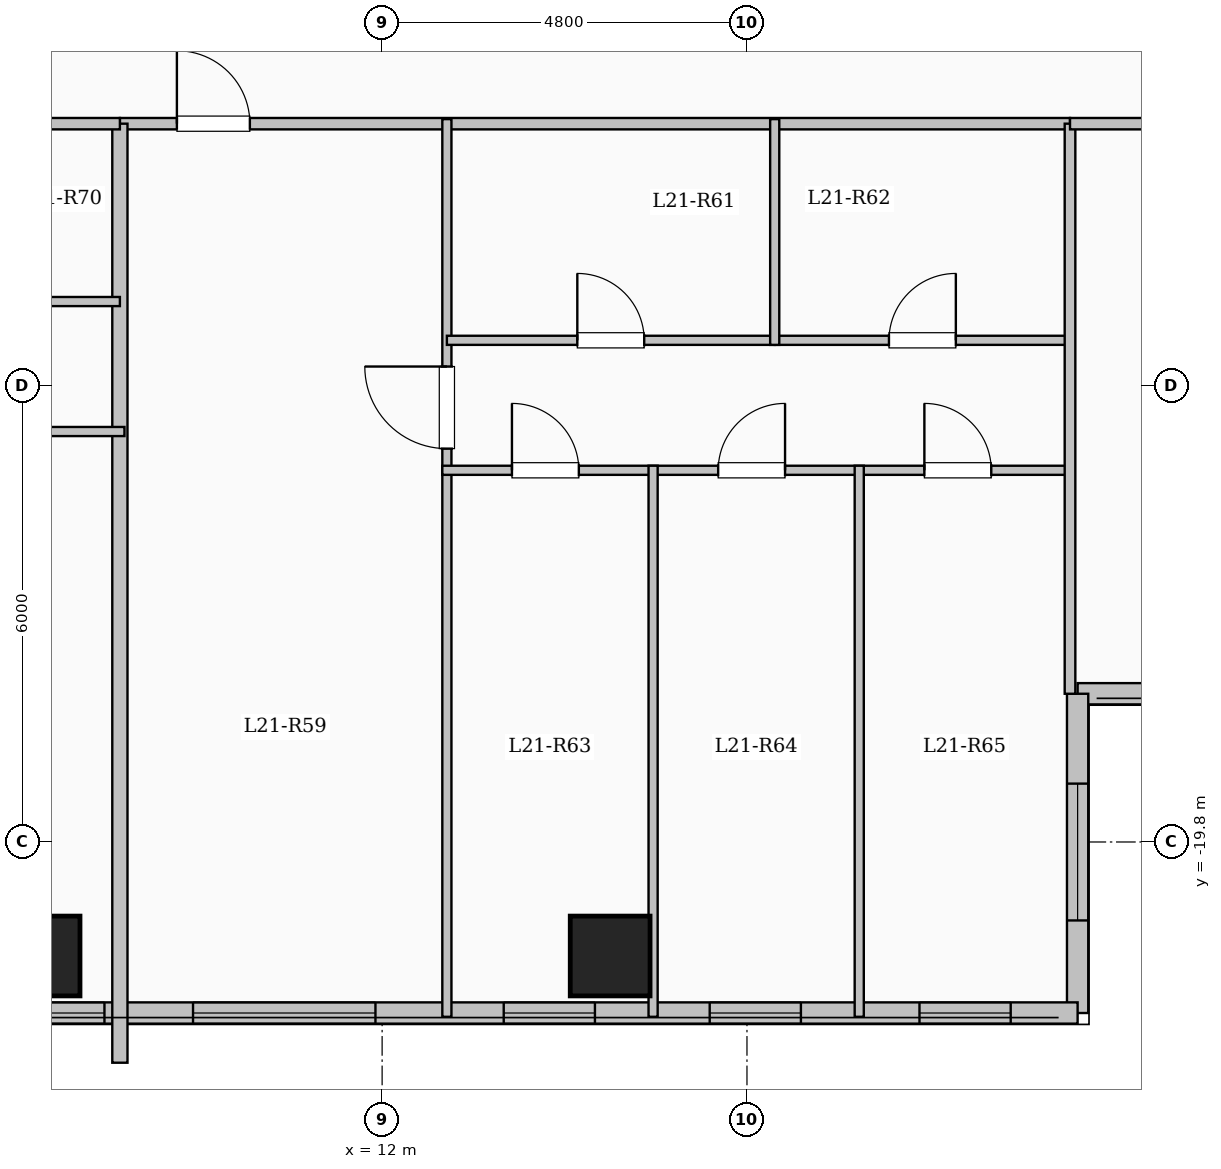
"""IFC4 building model, lengths in metres.
Left out: names, types, materials, properties, quantities, classifications, styles, units other than length and angle.
Written with IfcOpenShell. Run it as: python <this file> out.ifc"""

import sys

from ifc_helpers import new_model, si_unit, direction, frame, frame_2d, origin, origin_2d, place, context, subcontext, project, spatial, rectangle, extrude, element, fill, save


model = new_model("IFC4")
c1 = context("Model", 3, precision=1e-05, world=origin(), true_north=direction((0.0, 1.0)))
c2 = subcontext(c1, "Body", "Model", "MODEL_VIEW")
j1 = project(units=[si_unit("LENGTHUNIT", "METRE"), si_unit("PLANEANGLEUNIT", "RADIAN")], contexts=[c1])
p1 = place(None, origin())
s1 = spatial("IfcSite", under=j1, at=p1, CompositionType="ELEMENT")
p2 = place(p1, origin())
s2 = spatial("IfcBuilding", under=s1, at=p2, CompositionType="ELEMENT")
p3 = place(p2, frame((0.0, 0.0, 81.65)))
s3 = spatial("IfcBuildingStorey", under=s2, at=p3, CompositionType="ELEMENT", Elevation=81.65)
for number, where, z_axis, x_axis in (
    (1, (7.5, -21.3, 0.0), (0.0, 0.0, 1.0), (1.0, 0.0, 0.0)),
    (2, (15.0, -21.3, 0.0), (0.0, 0.0, 1.0), (1.0, 0.0, 0.0)),
):
    element("IfcColumn", number, at=place(p3, frame(where, z_axis=z_axis, x_axis=x_axis)), inside=s3, PredefinedType="COLUMN", context=c2, shape_type="SweptSolid", body=[
        extrude(rectangle(XDim=1.05, YDim=1.05, at=origin_2d()), origin(), (0.0, 0.0, 1.0), 3.35),
    ])
p4 = place(p3, frame((26.85, -17.85, 0.0), z_axis=(0.0, 0.0, 1.0), x_axis=(-1.0, 0.0, 0.0)))
e3 = element("IfcWall", 3, at=p4, inside=s3, PredefinedType="SOLIDWALL", context=c2, shape_type="SweptSolid", body=[
    extrude(rectangle(XDim=5.7, YDim=0.28, at=frame_2d((2.85, 0.0))), origin(), (0.0, 0.0, 1.0), 3.1),
])
p5 = place(p4, frame((1.675, 0.0, 0.9)))
e4 = element("IfcOpeningElement", 4, at=p5, cuts=e3, PredefinedType="OPENING", context=c2, shape_type="SweptSolid", body=[
    extrude(rectangle(XDim=2.4, YDim=1.8, at=frame_2d((1.2, 0.9))), frame((0.0, 0.15, 0.0), z_axis=(0.0, -1.0, 0.0), x_axis=(1.0, 0.0, 0.0)), (0.0, 0.0, 1.0), 0.3),
])
p6 = place(p3, frame((21.15, -17.85, 0.0), z_axis=(0.0, 0.0, 1.0), x_axis=(0.0, -1.0, 0.0)))
e5 = element("IfcWall", 5, at=p6, inside=s3, PredefinedType="SOLIDWALL", context=c2, shape_type="SweptSolid", body=[
    extrude(rectangle(XDim=4.2, YDim=0.28, at=frame_2d((2.1, 0.0))), origin(), (0.0, 0.0, 1.0), 3.1),
])
p7 = place(p6, frame((1.182, 0.0, 0.9)))
e6 = element("IfcOpeningElement", 6, at=p7, cuts=e5, PredefinedType="OPENING", context=c2, shape_type="SweptSolid", body=[
    extrude(rectangle(XDim=1.8, YDim=1.65, at=frame_2d((0.9, 0.825))), frame((0.0, 0.15, 0.0), z_axis=(0.0, -1.0, 0.0), x_axis=(1.0, 0.0, 0.0)), (0.0, 0.0, 1.0), 0.3),
])
p8 = place(p3, frame((21.15, -22.05, 0.0), z_axis=(0.0, 0.0, 1.0), x_axis=(-1.0, 0.0, 0.0)))
e7 = element("IfcWall", 7, at=p8, inside=s3, PredefinedType="SOLIDWALL", context=c2, shape_type="SweptSolid", body=[
    extrude(rectangle(XDim=13.8, YDim=0.28, at=frame_2d((6.9, 0.0))), origin(), (0.0, 0.0, 1.0), 3.1),
])
p9 = place(p8, frame((0.88, 0.0, 0.95)))
e8 = element("IfcOpeningElement", 8, at=p9, cuts=e7, PredefinedType="OPENING", context=c2, shape_type="SweptSolid", body=[
    extrude(rectangle(XDim=1.2, YDim=1.5, at=frame_2d((0.6, 0.75))), frame((0.0, 0.15, 0.0), z_axis=(0.0, -1.0, 0.0), x_axis=(1.0, 0.0, 0.0)), (0.0, 0.0, 1.0), 0.3),
])
p10 = place(p8, frame((3.64, 0.0, 0.95)))
e9 = element("IfcOpeningElement", 9, at=p10, cuts=e7, PredefinedType="OPENING", context=c2, shape_type="SweptSolid", body=[
    extrude(rectangle(XDim=1.2, YDim=1.5, at=frame_2d((0.6, 0.75))), frame((0.0, 0.15, 0.0), z_axis=(0.0, -1.0, 0.0), x_axis=(1.0, 0.0, 0.0)), (0.0, 0.0, 1.0), 0.3),
])
p11 = place(p8, frame((6.35, 0.0, 0.95)))
e10 = element("IfcOpeningElement", 10, at=p11, cuts=e7, PredefinedType="OPENING", context=c2, shape_type="SweptSolid", body=[
    extrude(rectangle(XDim=1.2, YDim=1.5, at=frame_2d((0.6, 0.75))), frame((0.0, 0.15, 0.0), z_axis=(0.0, -1.0, 0.0), x_axis=(1.0, 0.0, 0.0)), (0.0, 0.0, 1.0), 0.3),
])
p12 = place(p8, frame((9.238, 0.0, 0.9)))
e11 = element("IfcOpeningElement", 11, at=p12, cuts=e7, PredefinedType="OPENING", context=c2, shape_type="SweptSolid", body=[
    extrude(rectangle(XDim=2.4, YDim=1.8, at=frame_2d((1.2, 0.9))), frame((0.0, 0.15, 0.0), z_axis=(0.0, -1.0, 0.0), x_axis=(1.0, 0.0, 0.0)), (0.0, 0.0, 1.0), 0.3),
])
p13 = place(p8, frame((12.803, 0.0, 0.95)))
e12 = element("IfcOpeningElement", 12, at=p13, cuts=e7, PredefinedType="OPENING", context=c2, shape_type="SweptSolid", body=[
    extrude(rectangle(XDim=0.85, YDim=1.5, at=frame_2d((0.425, 0.75))), frame((0.0, 0.15, 0.0), z_axis=(0.0, -1.0, 0.0), x_axis=(1.0, 0.0, 0.0)), (0.0, 0.0, 1.0), 0.3),
])
p14 = place(p3, frame((8.55, -10.35, 0.0), z_axis=(0.0, 0.0, 1.0), x_axis=(1.0, 0.0, 0.0)))
e13 = element("IfcWall", 13, at=p14, inside=s3, PredefinedType="PARTITIONING", context=c2, shape_type="SweptSolid", body=[
    extrude(rectangle(XDim=12.5, YDim=0.15, at=frame_2d((6.25, 0.0))), origin(), (0.0, 0.0, 1.0), 3.1),
])
p15 = place(p14, frame((0.75, 0.0, 0.0)))
e14 = element("IfcOpeningElement", 14, at=p15, cuts=e13, PredefinedType="OPENING", context=c2, shape_type="SweptSolid", body=[
    extrude(rectangle(XDim=0.96, YDim=2.15, at=frame_2d((0.48, 1.075))), frame((0.0, 0.085, 0.0), z_axis=(0.0, -1.0, 0.0), x_axis=(1.0, 0.0, 0.0)), (0.0, 0.0, 1.0), 0.17),
])
p16 = place(p3, frame((12.852, -22.1, 0.0), z_axis=(0.0, 0.0, 1.0), x_axis=(0.0, 1.0, 0.0)))
e15 = element("IfcWall", 15, at=p16, inside=s3, PredefinedType="PARTITIONING", context=c2, shape_type="SweptSolid", body=[
    extrude(rectangle(XDim=11.81, YDim=0.12, at=frame_2d((5.905, 0.0))), origin(), (0.0, 0.0, 1.0), 3.1),
])
p17 = place(p16, frame((7.475, 0.0, 0.0)))
e16 = element("IfcOpeningElement", 16, at=p17, cuts=e15, PredefinedType="OPENING", context=c2, shape_type="SweptSolid", body=[
    extrude(rectangle(XDim=1.08, YDim=2.15, at=frame_2d((0.54, 1.075))), frame((0.0, 0.07, 0.0), z_axis=(0.0, -1.0, 0.0), x_axis=(1.0, 0.0, 0.0)), (0.0, 0.0, 1.0), 0.14),
])
p18 = place(p3, frame((12.852, -13.2, 0.0), z_axis=(0.0, 0.0, 1.0), x_axis=(1.0, 0.0, 0.0)))
e17 = element("IfcWall", 17, at=p18, inside=s3, PredefinedType="PARTITIONING", context=c2, shape_type="SweptSolid", body=[
    extrude(rectangle(XDim=4.313, YDim=0.12, at=frame_2d((2.156, 0.0))), origin(), (0.0, 0.0, 1.0), 3.1),
])
p19 = place(p18, frame((1.716, 0.0, 0.0)))
e18 = element("IfcOpeningElement", 18, at=p19, cuts=e17, PredefinedType="OPENING", context=c2, shape_type="SweptSolid", body=[
    extrude(rectangle(XDim=0.88, YDim=2.1, at=frame_2d((0.44, 1.05))), frame((0.0, 0.07, 0.0), z_axis=(0.0, -1.0, 0.0), x_axis=(1.0, 0.0, 0.0)), (0.0, 0.0, 1.0), 0.14),
])
p20 = place(p3, frame((17.165, -13.2, 0.0), z_axis=(0.0, 0.0, 1.0), x_axis=(1.0, 0.0, 0.0)))
e19 = element("IfcWall", 19, at=p20, inside=s3, PredefinedType="PARTITIONING", context=c2, shape_type="SweptSolid", body=[
    extrude(rectangle(XDim=3.885, YDim=0.12, at=frame_2d((1.942, 0.0))), origin(), (0.0, 0.0, 1.0), 3.1),
])
p21 = place(p20, frame((1.503, 0.0, 0.0)))
e20 = element("IfcOpeningElement", 20, at=p21, cuts=e19, PredefinedType="OPENING", context=c2, shape_type="SweptSolid", body=[
    extrude(rectangle(XDim=0.88, YDim=2.1, at=frame_2d((0.44, 1.05))), frame((0.0, 0.07, 0.0), z_axis=(0.0, -1.0, 0.0), x_axis=(1.0, 0.0, 0.0)), (0.0, 0.0, 1.0), 0.14),
])
p22 = place(p3, frame((12.792, -14.91, 0.0), z_axis=(0.0, 0.0, 1.0), x_axis=(1.0, 0.0, 0.0)))
e21 = element("IfcWall", 21, at=p22, inside=s3, PredefinedType="PARTITIONING", context=c2, shape_type="SweptSolid", body=[
    extrude(rectangle(XDim=8.318, YDim=0.12, at=frame_2d((4.159, 0.0))), origin(), (0.0, 0.0, 1.0), 3.1),
])
p23 = place(p22, frame((0.916, 0.0, 0.0)))
e22 = element("IfcOpeningElement", 22, at=p23, cuts=e21, PredefinedType="OPENING", context=c2, shape_type="SweptSolid", body=[
    extrude(rectangle(XDim=0.88, YDim=2.1, at=frame_2d((0.44, 1.05))), frame((0.0, 0.07, 0.0), z_axis=(0.0, -1.0, 0.0), x_axis=(1.0, 0.0, 0.0)), (0.0, 0.0, 1.0), 0.14),
])
p24 = place(p22, frame((3.629, 0.0, 0.0)))
e23 = element("IfcOpeningElement", 23, at=p24, cuts=e21, PredefinedType="OPENING", context=c2, shape_type="SweptSolid", body=[
    extrude(rectangle(XDim=0.88, YDim=2.1, at=frame_2d((0.44, 1.05))), frame((0.0, 0.07, 0.0), z_axis=(0.0, -1.0, 0.0), x_axis=(1.0, 0.0, 0.0)), (0.0, 0.0, 1.0), 0.14),
])
p25 = place(p22, frame((6.342, 0.0, 0.0)))
e24 = element("IfcOpeningElement", 24, at=p25, cuts=e21, PredefinedType="OPENING", context=c2, shape_type="SweptSolid", body=[
    extrude(rectangle(XDim=0.88, YDim=2.1, at=frame_2d((0.44, 1.05))), frame((0.0, 0.07, 0.0), z_axis=(0.0, -1.0, 0.0), x_axis=(1.0, 0.0, 0.0)), (0.0, 0.0, 1.0), 0.14),
])
p26 = place(p3, frame((17.165, -13.26, 0.0), z_axis=(0.0, 0.0, 1.0), x_axis=(0.0, 1.0, 0.0)))
e25 = element("IfcWall", 25, at=p26, inside=s3, PredefinedType="PARTITIONING", context=c2, shape_type="SweptSolid", body=[
    extrude(rectangle(XDim=2.97, YDim=0.12, at=frame_2d((1.485, 0.0))), origin(), (0.0, 0.0, 1.0), 3.1),
])
for number, where, z_axis, x_axis in (
    (26, (15.565, -22.1, 0.0), (0.0, 0.0, 1.0), (0.0, 1.0, 0.0)),
    (27, (18.277, -22.1, 0.0), (0.0, 0.0, 1.0), (0.0, 1.0, 0.0)),
):
    element("IfcWall", number, at=place(p3, frame(where, z_axis=z_axis, x_axis=x_axis)), inside=s3, PredefinedType="PARTITIONING", context=c2, shape_type="SweptSolid", body=[
        extrude(rectangle(XDim=7.25, YDim=0.12, at=frame_2d((3.625, 0.0))), origin(), (0.0, 0.0, 1.0), 3.1),
    ])
p27 = place(p3, frame((8.55, -22.704, 0.0), z_axis=(0.0, 0.0, 1.0), x_axis=(0.0, 1.0, 0.0)))
e28 = element("IfcWall", 28, at=p27, inside=s3, PredefinedType="SOLIDWALL", context=c2, shape_type="SweptSolid", body=[
    extrude(rectangle(XDim=12.354, YDim=0.2, at=frame_2d((6.177, 0.0))), origin(), (0.0, 0.0, 1.0), 3.1),
])
p28 = place(p3, frame((-8.55, -10.35, 0.0), z_axis=(0.0, 0.0, 1.0), x_axis=(1.0, 0.0, 0.0)))
e29 = element("IfcWall", 29, at=p28, inside=s3, PredefinedType="PARTITIONING", context=c2, shape_type="SweptSolid", body=[
    extrude(rectangle(XDim=17.1, YDim=0.15, at=frame_2d((8.55, 0.0))), origin(), (0.0, 0.0, 1.0), 3.1),
])
p29 = place(p28, frame((1.6, 0.0, 0.0)))
e30 = element("IfcOpeningElement", 30, at=p29, cuts=e29, PredefinedType="OPENING", context=c2, shape_type="SweptSolid", body=[
    extrude(rectangle(XDim=0.96, YDim=2.15, at=frame_2d((0.48, 1.075))), frame((0.0, 0.085, 0.0), z_axis=(0.0, -1.0, 0.0), x_axis=(1.0, 0.0, 0.0)), (0.0, 0.0, 1.0), 0.17),
])
p30 = place(p3, frame((4.104, -12.69, 0.0), z_axis=(0.0, 0.0, 1.0), x_axis=(1.0, 0.0, 0.0)))
e31 = element("IfcWall", 31, at=p30, inside=s3, PredefinedType="PARTITIONING", context=c2, shape_type="SweptSolid", body=[
    extrude(rectangle(XDim=4.446, YDim=0.12, at=frame_2d((2.223, 0.0))), origin(), (0.0, 0.0, 1.0), 2.635),
])
p31 = place(p30, frame((1.783, 0.0, 0.0)))
e32 = element("IfcOpeningElement", 32, at=p31, cuts=e31, PredefinedType="OPENING", context=c2, shape_type="SweptSolid", body=[
    extrude(rectangle(XDim=0.88, YDim=2.1, at=frame_2d((0.44, 1.05))), frame((0.0, 0.07, 0.0), z_axis=(0.0, -1.0, 0.0), x_axis=(1.0, 0.0, 0.0)), (0.0, 0.0, 1.0), 0.14),
])
p32 = place(p3, frame((-1.756, -14.4, 0.0), z_axis=(0.0, 0.0, 1.0), x_axis=(1.0, 0.0, 0.0)))
e33 = element("IfcWall", 33, at=p32, inside=s3, PredefinedType="PARTITIONING", context=c2, shape_type="SweptSolid", body=[
    extrude(rectangle(XDim=10.366, YDim=0.12, at=frame_2d((5.183, 0.0))), origin(), (0.0, 0.0, 1.0), 2.635),
])
p33 = place(p32, frame((1.256, 0.0, 0.0)))
e34 = element("IfcOpeningElement", 34, at=p33, cuts=e33, PredefinedType="OPENING", context=c2, shape_type="SweptSolid", body=[
    extrude(rectangle(XDim=0.88, YDim=2.1, at=frame_2d((0.44, 1.05))), frame((0.0, 0.07, 0.0), z_axis=(0.0, -1.0, 0.0), x_axis=(1.0, 0.0, 0.0)), (0.0, 0.0, 1.0), 0.14),
])
p34 = place(p32, frame((4.648, 0.0, 0.0)))
e35 = element("IfcOpeningElement", 35, at=p34, cuts=e33, PredefinedType="OPENING", context=c2, shape_type="SweptSolid", body=[
    extrude(rectangle(XDim=0.88, YDim=2.1, at=frame_2d((0.44, 1.05))), frame((0.0, 0.07, 0.0), z_axis=(0.0, -1.0, 0.0), x_axis=(1.0, 0.0, 0.0)), (0.0, 0.0, 1.0), 0.14),
])
p35 = place(p32, frame((8.04, 0.0, 0.0)))
e36 = element("IfcOpeningElement", 36, at=p35, cuts=e33, PredefinedType="OPENING", context=c2, shape_type="SweptSolid", body=[
    extrude(rectangle(XDim=0.88, YDim=2.1, at=frame_2d((0.44, 1.05))), frame((0.0, 0.07, 0.0), z_axis=(0.0, -1.0, 0.0), x_axis=(1.0, 0.0, 0.0)), (0.0, 0.0, 1.0), 0.14),
])
p36 = place(p3, frame((21.05, -17.85, 0.0), z_axis=(0.0, 0.0, 1.0), x_axis=(0.0, 1.0, 0.0)))
e37 = element("IfcWall", 37, at=p36, inside=s3, PredefinedType="PARTITIONING", context=c2, shape_type="SweptSolid", body=[
    extrude(rectangle(XDim=7.5, YDim=0.14, at=frame_2d((3.75, 0.0))), origin(), (0.0, 0.0, 1.0), 3.1),
])
p37 = place(p3, frame((21.05, -10.35, 0.0), z_axis=(0.0, 0.0, 1.0), x_axis=(1.0, 0.0, 0.0)))
e38 = element("IfcWall", 38, at=p37, inside=s3, PredefinedType="PARTITIONING", context=c2, shape_type="SweptSolid", body=[
    extrude(rectangle(XDim=5.83, YDim=0.15, at=frame_2d((2.915, 0.0))), origin(), (0.0, 0.0, 1.0), 3.1),
])
p38 = place(p37, frame((2.44, 0.0, 0.0)))
e39 = element("IfcOpeningElement", 39, at=p38, cuts=e38, PredefinedType="OPENING", context=c2, shape_type="SweptSolid", body=[
    extrude(rectangle(XDim=0.95, YDim=2.15, at=frame_2d((0.475, 1.075))), frame((0.0, 0.085, 0.0), z_axis=(0.0, -1.0, 0.0), x_axis=(1.0, 0.0, 0.0)), (0.0, 0.0, 1.0), 0.17),
])
p39 = place(p7, origin())
e40 = element("IfcWindow", 40, at=p39, inside=s3, PartitioningType="SINGLE_PANEL", PredefinedType="WINDOW", context=c2, shape_type="SweptSolid", body=[
    extrude(rectangle(XDim=1.8, YDim=1.65, at=frame_2d((0.9, 0.825))), frame((0.0, 0.03, 0.0), z_axis=(0.0, -1.0, 0.0), x_axis=(1.0, 0.0, 0.0)), (0.0, 0.0, 1.0), 0.06),
])
fill(e6, e40)
p40 = place(p9, origin())
e41 = element("IfcWindow", 41, at=p40, inside=s3, PartitioningType="SINGLE_PANEL", PredefinedType="WINDOW", context=c2, shape_type="SweptSolid", body=[
    extrude(rectangle(XDim=1.2, YDim=1.5, at=frame_2d((0.6, 0.75))), frame((0.0, 0.03, 0.0), z_axis=(0.0, -1.0, 0.0), x_axis=(1.0, 0.0, 0.0)), (0.0, 0.0, 1.0), 0.06),
])
fill(e8, e41)
p41 = place(p10, origin())
e42 = element("IfcWindow", 42, at=p41, inside=s3, PartitioningType="SINGLE_PANEL", PredefinedType="WINDOW", context=c2, shape_type="SweptSolid", body=[
    extrude(rectangle(XDim=1.2, YDim=1.5, at=frame_2d((0.6, 0.75))), frame((0.0, 0.03, 0.0), z_axis=(0.0, -1.0, 0.0), x_axis=(1.0, 0.0, 0.0)), (0.0, 0.0, 1.0), 0.06),
])
fill(e9, e42)
p42 = place(p11, origin())
e43 = element("IfcWindow", 43, at=p42, inside=s3, PartitioningType="SINGLE_PANEL", PredefinedType="WINDOW", context=c2, shape_type="SweptSolid", body=[
    extrude(rectangle(XDim=1.2, YDim=1.5, at=frame_2d((0.6, 0.75))), frame((0.0, 0.03, 0.0), z_axis=(0.0, -1.0, 0.0), x_axis=(1.0, 0.0, 0.0)), (0.0, 0.0, 1.0), 0.06),
])
fill(e10, e43)
p43 = place(p12, origin())
e44 = element("IfcWindow", 44, at=p43, inside=s3, PartitioningType="SINGLE_PANEL", PredefinedType="WINDOW", context=c2, shape_type="SweptSolid", body=[
    extrude(rectangle(XDim=2.4, YDim=1.8, at=frame_2d((1.2, 0.9))), frame((0.0, 0.03, 0.0), z_axis=(0.0, -1.0, 0.0), x_axis=(1.0, 0.0, 0.0)), (0.0, 0.0, 1.0), 0.06),
])
fill(e11, e44)
p44 = place(p13, origin())
e45 = element("IfcWindow", 45, at=p44, inside=s3, PartitioningType="SINGLE_PANEL", PredefinedType="WINDOW", context=c2, shape_type="SweptSolid", body=[
    extrude(rectangle(XDim=0.85, YDim=1.5, at=frame_2d((0.425, 0.75))), frame((0.0, 0.03, 0.0), z_axis=(0.0, -1.0, 0.0), x_axis=(1.0, 0.0, 0.0)), (0.0, 0.0, 1.0), 0.06),
])
fill(e12, e45)
p45 = place(p15, origin())
e46 = element("IfcDoor", 46, at=p45, inside=s3, OperationType="SINGLE_SWING_LEFT", PredefinedType="DOOR", context=c2, shape_type="SweptSolid", body=[
    extrude(rectangle(XDim=0.96, YDim=2.15, at=frame_2d((0.48, 1.075))), frame((0.0, 0.025, 0.0), z_axis=(0.0, -1.0, 0.0), x_axis=(1.0, 0.0, 0.0)), (0.0, 0.0, 1.0), 0.05),
])
fill(e14, e46)
p46 = place(p17, origin())
e47 = element("IfcDoor", 47, at=p46, inside=s3, OperationType="SINGLE_SWING_RIGHT", PredefinedType="DOOR", context=c2, shape_type="SweptSolid", body=[
    extrude(rectangle(XDim=1.08, YDim=2.15, at=frame_2d((0.54, 1.075))), frame((0.0, 0.025, 0.0), z_axis=(0.0, -1.0, 0.0), x_axis=(1.0, 0.0, 0.0)), (0.0, 0.0, 1.0), 0.05),
])
fill(e16, e47)
p47 = place(p19, origin())
e48 = element("IfcDoor", 48, at=p47, inside=s3, OperationType="SINGLE_SWING_LEFT", PredefinedType="DOOR", context=c2, shape_type="SweptSolid", body=[
    extrude(rectangle(XDim=0.88, YDim=2.1, at=frame_2d((0.44, 1.05))), frame((0.0, 0.025, 0.0), z_axis=(0.0, -1.0, 0.0), x_axis=(1.0, 0.0, 0.0)), (0.0, 0.0, 1.0), 0.05),
])
fill(e18, e48)
p48 = place(p21, origin())
e49 = element("IfcDoor", 49, at=p48, inside=s3, OperationType="SINGLE_SWING_RIGHT", PredefinedType="DOOR", context=c2, shape_type="SweptSolid", body=[
    extrude(rectangle(XDim=0.88, YDim=2.1, at=frame_2d((0.44, 1.05))), frame((0.0, 0.025, 0.0), z_axis=(0.0, -1.0, 0.0), x_axis=(1.0, 0.0, 0.0)), (0.0, 0.0, 1.0), 0.05),
])
fill(e20, e49)
p49 = place(p23, origin())
e50 = element("IfcDoor", 50, at=p49, inside=s3, OperationType="SINGLE_SWING_LEFT", PredefinedType="DOOR", context=c2, shape_type="SweptSolid", body=[
    extrude(rectangle(XDim=0.88, YDim=2.1, at=frame_2d((0.44, 1.05))), frame((0.0, 0.025, 0.0), z_axis=(0.0, -1.0, 0.0), x_axis=(1.0, 0.0, 0.0)), (0.0, 0.0, 1.0), 0.05),
])
fill(e22, e50)
p50 = place(p24, origin())
e51 = element("IfcDoor", 51, at=p50, inside=s3, OperationType="SINGLE_SWING_RIGHT", PredefinedType="DOOR", context=c2, shape_type="SweptSolid", body=[
    extrude(rectangle(XDim=0.88, YDim=2.1, at=frame_2d((0.44, 1.05))), frame((0.0, 0.025, 0.0), z_axis=(0.0, -1.0, 0.0), x_axis=(1.0, 0.0, 0.0)), (0.0, 0.0, 1.0), 0.05),
])
fill(e23, e51)
p51 = place(p25, origin())
e52 = element("IfcDoor", 52, at=p51, inside=s3, OperationType="SINGLE_SWING_LEFT", PredefinedType="DOOR", context=c2, shape_type="SweptSolid", body=[
    extrude(rectangle(XDim=0.88, YDim=2.1, at=frame_2d((0.44, 1.05))), frame((0.0, 0.025, 0.0), z_axis=(0.0, -1.0, 0.0), x_axis=(1.0, 0.0, 0.0)), (0.0, 0.0, 1.0), 0.05),
])
fill(e24, e52)
save(model, sys.argv[1])
